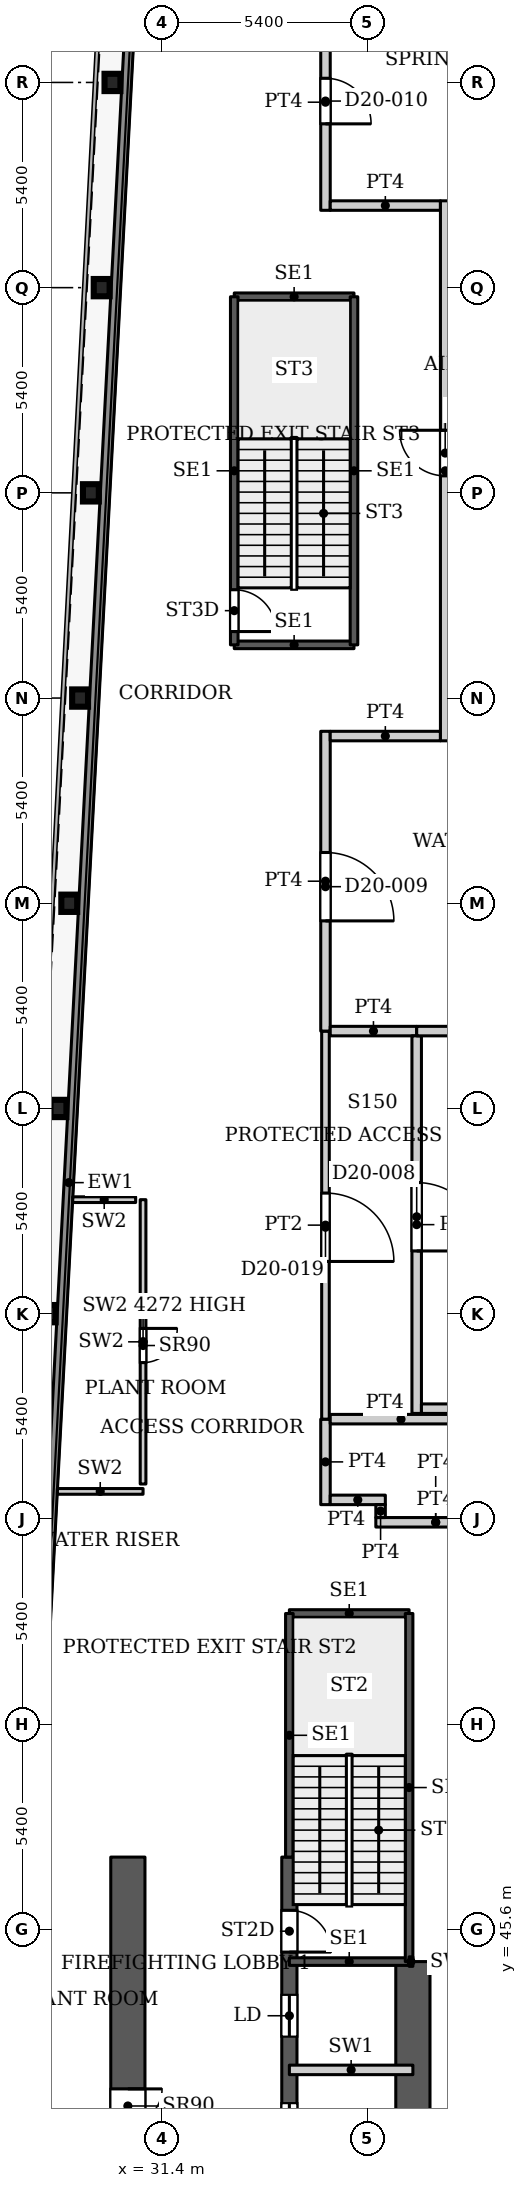
"""IFC4 building model, lengths in metres.
Left out: names, types, materials, properties, quantities, classifications, styles, units other than length and angle.
Written with IfcOpenShell. Run it as: python <this file> out.ifc"""

import sys

from ifc_helpers import new_model, si_unit, direction, frame, frame_2d, origin, origin_2d, place, context, subcontext, project, spatial, rectangle, i_section, extrude, source, transform, mapped, element, fill, save


model = new_model("IFC4")
c1 = context("Model", 3, precision=1e-05, world=origin(), true_north=direction((0.0, 1.0)))
c2 = subcontext(c1, "Body", "Model", "MODEL_VIEW")
j1 = project(units=[si_unit("LENGTHUNIT", "METRE"), si_unit("PLANEANGLEUNIT", "RADIAN")], contexts=[c1])
p1 = place(None, origin())
s1 = spatial("IfcSite", under=j1, at=p1, CompositionType="ELEMENT")
p2 = place(p1, origin())
s2 = spatial("IfcBuilding", under=s1, at=p2, CompositionType="ELEMENT")
p3 = place(p2, frame((0.0, 0.0, 89.0)))
s3 = spatial("IfcBuildingStorey", under=s2, at=p3, CompositionType="ELEMENT", Elevation=89.0)
for number, where, z_axis, x_axis in (
    (1, (28.39, 61.8, 0.0), (0.0, 0.0, 1.0), (1.0, 0.0, 0.0)),
    (2, (28.674, 67.2, 0.0), (0.0, 0.0, 1.0), (1.0, 0.0, 0.0)),
    (3, (28.958, 72.6, 0.0), (0.0, 0.0, 1.0), (1.0, 0.0, 0.0)),
    (4, (29.243, 78.0, 0.0), (0.0, 0.0, 1.0), (1.0, 0.0, 0.0)),
    (5, (29.527, 83.4, 0.0), (0.0, 0.0, 1.0), (1.0, 0.0, 0.0)),
    (6, (29.811, 88.8, 0.0), (0.0, 0.0, 1.0), (1.0, 0.0, 0.0)),
    (7, (30.095, 94.2, 0.0), (0.0, 0.0, 1.0), (1.0, 0.0, 0.0)),
):
    element("IfcColumn", number, at=place(p3, frame(where, z_axis=z_axis, x_axis=x_axis)), inside=s3, PredefinedType="COLUMN", context=c2, shape_type="SweptSolid", body=[
        extrude(i_section(OverallWidth=0.418, OverallDepth=0.455, WebThickness=0.042, FlangeThickness=0.068, FilletRadius=0.014, at=origin_2d()), origin(), (0.0, 0.0, 1.0), 5.1),
    ])
p4 = place(p3, frame((34.75, 29.05, 0.0), z_axis=(0.0, 0.0, 1.0), x_axis=(0.0, 1.0, 0.0)))
e8 = element("IfcWall", 8, at=p4, inside=s3, PredefinedType="SHEAR", context=c2, shape_type="SweptSolid", body=[
    extrude(rectangle(XDim=18.45, YDim=0.4, at=frame_2d((9.225, 0.0))), origin(), (0.0, 0.0, 1.0), 5.1),
])
p5 = place(p4, frame((8.025, 0.0, 0.0)))
e9 = element("IfcOpeningElement", 9, at=p5, cuts=e8, PredefinedType="OPENING", context=c2, shape_type="SweptSolid", body=[
    extrude(rectangle(XDim=1.1, YDim=2.2, at=frame_2d((0.55, 1.1))), frame((0.0, 0.21, 0.0), z_axis=(0.0, -1.0, 0.0), x_axis=(1.0, 0.0, 0.0)), (0.0, 0.0, 1.0), 0.42),
])
p6 = place(p4, frame((10.875, 0.0, 0.0)))
e10 = element("IfcOpeningElement", 10, at=p6, cuts=e8, PredefinedType="OPENING", context=c2, shape_type="SweptSolid", body=[
    extrude(rectangle(XDim=1.1, YDim=2.2, at=frame_2d((0.55, 1.1))), frame((0.0, 0.21, 0.0), z_axis=(0.0, -1.0, 0.0), x_axis=(1.0, 0.0, 0.0)), (0.0, 0.0, 1.0), 0.42),
])
p7 = place(p4, frame((13.725, 0.0, 0.0)))
e11 = element("IfcOpeningElement", 11, at=p7, cuts=e8, PredefinedType="OPENING", context=c2, shape_type="SweptSolid", body=[
    extrude(rectangle(XDim=1.1, YDim=2.2, at=frame_2d((0.55, 1.1))), frame((0.0, 0.21, 0.0), z_axis=(0.0, -1.0, 0.0), x_axis=(1.0, 0.0, 0.0)), (0.0, 0.0, 1.0), 0.42),
])
p8 = place(p4, frame((15.95, 0.0, 0.0)))
e12 = element("IfcOpeningElement", 12, at=p8, cuts=e8, PredefinedType="OPENING", context=c2, shape_type="SweptSolid", body=[
    extrude(rectangle(XDim=1.1, YDim=2.2, at=frame_2d((0.55, 1.1))), frame((0.0, 0.21, 0.0), z_axis=(0.0, -1.0, 0.0), x_axis=(1.0, 0.0, 0.0)), (0.0, 0.0, 1.0), 0.42),
])
p9 = place(p3, frame((38.0, 36.2, 0.0), z_axis=(0.0, 0.0, 1.0), x_axis=(0.0, 1.0, 0.0)))
e13 = element("IfcWall", 13, at=p9, inside=s3, PredefinedType="SHEAR", context=c2, shape_type="SweptSolid", body=[
    extrude(rectangle(XDim=8.55, YDim=0.9, at=frame_2d((4.275, 0.0))), origin(), (0.0, 0.0, 1.0), 5.1),
])
p10 = place(p3, frame((30.5, 29.05, 0.0), z_axis=(0.0, 0.0, 1.0), x_axis=(0.0, 1.0, 0.0)))
e14 = element("IfcWall", 14, at=p10, inside=s3, PredefinedType="SHEAR", context=c2, shape_type="SweptSolid", body=[
    extrude(rectangle(XDim=18.45, YDim=0.9, at=frame_2d((9.225, 0.0))), origin(), (0.0, 0.0, 1.0), 5.1),
])
p11 = place(p10, frame((0.944, 0.0, 0.0)))
e15 = element("IfcOpeningElement", 15, at=p11, cuts=e14, PredefinedType="OPENING", context=c2, shape_type="SweptSolid", body=[
    extrude(rectangle(XDim=0.9, YDim=2.2, at=frame_2d((0.45, 1.1))), frame((0.0, 0.46, 0.0), z_axis=(0.0, -1.0, 0.0), x_axis=(1.0, 0.0, 0.0)), (0.0, 0.0, 1.0), 0.92),
])
p12 = place(p10, frame((6.975, 0.0, 0.0)))
e16 = element("IfcOpeningElement", 16, at=p12, cuts=e14, PredefinedType="OPENING", context=c2, shape_type="SweptSolid", body=[
    extrude(rectangle(XDim=0.9, YDim=2.2, at=frame_2d((0.45, 1.1))), frame((0.0, 0.46, 0.0), z_axis=(0.0, -1.0, 0.0), x_axis=(1.0, 0.0, 0.0)), (0.0, 0.0, 1.0), 0.92),
])
p13 = place(p10, frame((11.45, 0.0, 0.0)))
e17 = element("IfcOpeningElement", 17, at=p13, cuts=e14, PredefinedType="OPENING", context=c2, shape_type="SweptSolid", body=[
    extrude(rectangle(XDim=0.9, YDim=2.2, at=frame_2d((0.45, 1.1))), frame((0.0, 0.46, 0.0), z_axis=(0.0, -1.0, 0.0), x_axis=(1.0, 0.0, 0.0)), (0.0, 0.0, 1.0), 0.92),
])
p14 = place(p3, frame((27.195, 31.969, 0.0), z_axis=(0.0, 0.0, 1.0), x_axis=(0.052556141556, 0.99861797099, 0.0)))
e18 = element("IfcWall", 18, at=p14, inside=s3, PredefinedType="SOLIDWALL", context=c2, shape_type="SweptSolid", body=[
    extrude(rectangle(XDim=66.651, YDim=0.25, at=frame_2d((33.326, 0.0))), origin(), (0.0, 0.0, 1.0), 4.95),
])
for number, where, z_axis, x_axis in (
    (19, (34.75, 44.75, 0.0), (0.0, 0.0, 1.0), (1.0, 0.0, 0.0)),
    (20, (34.75, 53.91, 0.0), (0.0, 0.0, 1.0), (1.0, 0.0, 0.0)),
):
    element("IfcWall", number, at=place(p3, frame(where, z_axis=z_axis, x_axis=x_axis)), inside=s3, PredefinedType="SHEAR", context=c2, shape_type="SweptSolid", body=[
        extrude(rectangle(XDim=3.15, YDim=0.2, at=frame_2d((1.575, 0.0))), origin(), (0.0, 0.0, 1.0), 5.1),
    ])
p15 = place(p3, frame((34.75, 47.5, 0.0), z_axis=(0.0, 0.0, 1.0), x_axis=(0.0, 1.0, 0.0)))
e21 = element("IfcWall", 21, at=p15, inside=s3, PredefinedType="SHEAR", context=c2, shape_type="SweptSolid", body=[
    extrude(rectangle(XDim=6.41, YDim=0.2, at=frame_2d((3.205, 0.0))), origin(), (0.0, 0.0, 1.0), 5.1),
])
p16 = place(p3, frame((37.9, 44.75, 0.0), z_axis=(0.0, 0.0, 1.0), x_axis=(0.0, 1.0, 0.0)))
e22 = element("IfcWall", 22, at=p16, inside=s3, PredefinedType="SHEAR", context=c2, shape_type="SweptSolid", body=[
    extrude(rectangle(XDim=9.16, YDim=0.2, at=frame_2d((4.58, 0.0))), origin(), (0.0, 0.0, 1.0), 5.1),
])
for number, where, z_axis, x_axis in (
    (23, (33.3, 79.4, 0.0), (0.0, 0.0, 1.0), (1.0, 0.0, 0.0)),
    (24, (33.3, 88.56, 0.0), (0.0, 0.0, 1.0), (1.0, 0.0, 0.0)),
):
    element("IfcWall", number, at=place(p3, frame(where, z_axis=z_axis, x_axis=x_axis)), inside=s3, PredefinedType="SHEAR", context=c2, shape_type="SweptSolid", body=[
        extrude(rectangle(XDim=3.15, YDim=0.2, at=frame_2d((1.575, 0.0))), origin(), (0.0, 0.0, 1.0), 5.1),
    ])
p17 = place(p3, frame((33.3, 79.4, 0.0), z_axis=(0.0, 0.0, 1.0), x_axis=(0.0, 1.0, 0.0)))
e25 = element("IfcWall", 25, at=p17, inside=s3, PredefinedType="SHEAR", context=c2, shape_type="SweptSolid", body=[
    extrude(rectangle(XDim=9.16, YDim=0.2, at=frame_2d((4.58, 0.0))), origin(), (0.0, 0.0, 1.0), 5.1),
])
p18 = place(p17, frame((0.35, 0.0, 0.0)))
e26 = element("IfcOpeningElement", 26, at=p18, cuts=e25, PredefinedType="OPENING", context=c2, shape_type="SweptSolid", body=[
    extrude(rectangle(XDim=1.1, YDim=2.2, at=frame_2d((0.55, 1.1))), frame((0.0, 0.11, 0.0), z_axis=(0.0, -1.0, 0.0), x_axis=(1.0, 0.0, 0.0)), (0.0, 0.0, 1.0), 0.22),
])
p19 = place(p3, frame((36.45, 79.4, 0.0), z_axis=(0.0, 0.0, 1.0), x_axis=(0.0, 1.0, 0.0)))
e27 = element("IfcWall", 27, at=p19, inside=s3, PredefinedType="SHEAR", context=c2, shape_type="SweptSolid", body=[
    extrude(rectangle(XDim=9.16, YDim=0.2, at=frame_2d((4.58, 0.0))), origin(), (0.0, 0.0, 1.0), 5.1),
])
p20 = place(p3, frame((34.75, 41.9, 0.0), z_axis=(0.0, 0.0, 1.0), x_axis=(1.0, 0.0, 0.0)))
e28 = element("IfcWall", 28, at=p20, inside=s3, PredefinedType="PARTITIONING", context=c2, shape_type="SweptSolid", body=[
    extrude(rectangle(XDim=3.25, YDim=0.25, at=frame_2d((1.625, 0.0))), origin(), (0.0, 0.0, 1.0), 5.1),
])
p21 = place(p3, frame((37.9, 44.75, 0.0), z_axis=(0.0, 0.0, 1.0), x_axis=(1.0, 0.0, 0.0)))
e29 = element("IfcWall", 29, at=p21, inside=s3, PredefinedType="PARTITIONING", context=c2, shape_type="SweptSolid", body=[
    extrude(rectangle(XDim=0.1, YDim=0.25, at=frame_2d((0.05, 0.0))), origin(), (0.0, 0.0, 1.0), 5.1),
])
p22 = place(p3, frame((28.646, 57.123, 0.0), z_axis=(0.0, 0.0, 1.0), x_axis=(1.0, 0.0, 0.0)))
e30 = element("IfcWall", 30, at=p22, inside=s3, PredefinedType="PARTITIONING", context=c2, shape_type="SweptSolid", body=[
    extrude(rectangle(XDim=2.254, YDim=0.15, at=frame_2d((1.127, 0.0))), origin(), (0.0, 0.0, 1.0), 5.1),
])
p23 = place(p3, frame((30.9, 57.318, 0.0), z_axis=(0.0, 0.0, 1.0), x_axis=(0.0, 1.0, 0.0)))
e31 = element("IfcWall", 31, at=p23, inside=s3, PredefinedType="PARTITIONING", context=c2, shape_type="SweptSolid", body=[
    extrude(rectangle(XDim=7.482, YDim=0.15, at=frame_2d((3.741, 0.0))), origin(), (0.0, 0.0, 1.0), 4.272),
])
p24 = place(p23, frame((3.194, 0.0, 0.0)))
e32 = element("IfcOpeningElement", 32, at=p24, cuts=e31, PredefinedType="OPENING", context=c2, shape_type="SweptSolid", body=[
    extrude(rectangle(XDim=0.9, YDim=2.2, at=frame_2d((0.45, 1.1))), frame((0.0, 0.085, 0.0), z_axis=(0.0, -1.0, 0.0), x_axis=(1.0, 0.0, 0.0)), (0.0, 0.0, 1.0), 0.17),
])
p25 = place(p3, frame((29.05, 64.8, 0.0), z_axis=(0.0, 0.0, 1.0), x_axis=(1.0, 0.0, 0.0)))
e33 = element("IfcWall", 33, at=p25, inside=s3, PredefinedType="PARTITIONING", context=c2, shape_type="SweptSolid", body=[
    extrude(rectangle(XDim=1.655, YDim=0.15, at=frame_2d((0.828, 0.0))), origin(), (0.0, 0.0, 1.0), 5.1),
])
p26 = place(p3, frame((35.7, 56.775, 0.0), z_axis=(0.0, 0.0, 1.0), x_axis=(0.0, 1.0, 0.0)))
e34 = element("IfcWall", 34, at=p26, inside=s3, PredefinedType="PARTITIONING", context=c2, shape_type="SweptSolid", body=[
    extrude(rectangle(XDim=2.249, YDim=0.25, at=frame_2d((1.125, 0.0))), origin(), (0.0, 0.0, 1.0), 4.8),
])
p27 = place(p3, frame((35.7, 59.024, 0.0), z_axis=(0.0, 0.0, 1.0), x_axis=(0.0, 1.0, 0.0)))
e35 = element("IfcWall", 35, at=p27, inside=s3, PredefinedType="PARTITIONING", context=c2, shape_type="SweptSolid", body=[
    extrude(rectangle(XDim=10.212, YDim=0.2, at=frame_2d((5.106, 0.0))), origin(), (0.0, 0.0, 1.0), 4.8),
])
p28 = place(p27, frame((4.15, 0.0, 0.0)))
e36 = element("IfcOpeningElement", 36, at=p28, cuts=e35, PredefinedType="OPENING", context=c2, shape_type="SweptSolid", body=[
    extrude(rectangle(XDim=1.8, YDim=2.1, at=frame_2d((0.9, 1.05))), frame((0.0, 0.11, 0.0), z_axis=(0.0, -1.0, 0.0), x_axis=(1.0, 0.0, 0.0)), (0.0, 0.0, 1.0), 0.22),
])
p29 = place(p3, frame((35.7, 69.236, 0.0), z_axis=(0.0, 0.0, 1.0), x_axis=(0.0, 1.0, 0.0)))
e37 = element("IfcWall", 37, at=p29, inside=s3, PredefinedType="PARTITIONING", context=c2, shape_type="SweptSolid", body=[
    extrude(rectangle(XDim=7.889, YDim=0.25, at=frame_2d((3.944, 0.0))), origin(), (0.0, 0.0, 1.0), 4.8),
])
p30 = place(p29, frame((2.9, 0.0, 0.0)))
e38 = element("IfcOpeningElement", 38, at=p30, cuts=e37, PredefinedType="OPENING", context=c2, shape_type="SweptSolid", body=[
    extrude(rectangle(XDim=1.8, YDim=2.1, at=frame_2d((0.9, 1.05))), frame((0.0, 0.135, 0.0), z_axis=(0.0, -1.0, 0.0), x_axis=(1.0, 0.0, 0.0)), (0.0, 0.0, 1.0), 0.27),
])
p31 = place(p3, frame((35.7, 90.835, 0.0), z_axis=(0.0, 0.0, 1.0), x_axis=(0.0, 1.0, 0.0)))
e39 = element("IfcWall", 39, at=p31, inside=s3, PredefinedType="PARTITIONING", context=c2, shape_type="SweptSolid", body=[
    extrude(rectangle(XDim=5.69, YDim=0.25, at=frame_2d((2.845, 0.0))), origin(), (0.0, 0.0, 1.0), 4.8),
])
p32 = place(p31, frame((2.275, 0.0, 0.0)))
e40 = element("IfcOpeningElement", 40, at=p32, cuts=e39, PredefinedType="OPENING", context=c2, shape_type="SweptSolid", body=[
    extrude(rectangle(XDim=1.2, YDim=2.1, at=frame_2d((0.6, 1.05))), frame((0.0, 0.135, 0.0), z_axis=(0.0, -1.0, 0.0), x_axis=(1.0, 0.0, 0.0)), (0.0, 0.0, 1.0), 0.27),
])
p33 = place(p3, frame((35.825, 56.9, 0.0), z_axis=(0.0, 0.0, 1.0), x_axis=(1.0, 0.0, 0.0)))
e41 = element("IfcWall", 41, at=p33, inside=s3, PredefinedType="PARTITIONING", context=c2, shape_type="SweptSolid", body=[
    extrude(rectangle(XDim=1.45, YDim=0.25, at=frame_2d((0.725, 0.0))), origin(), (0.0, 0.0, 1.0), 4.8),
])
p34 = place(p3, frame((35.825, 59.024, 0.0), z_axis=(0.0, 0.0, 1.0), x_axis=(1.0, 0.0, 0.0)))
e42 = element("IfcWall", 42, at=p34, inside=s3, PredefinedType="PARTITIONING", context=c2, shape_type="SweptSolid", body=[
    extrude(rectangle(XDim=3.725, YDim=0.25, at=frame_2d((1.863, 0.0))), origin(), (0.0, 0.0, 1.0), 4.8),
])
p35 = place(p3, frame((35.825, 69.236, 0.0), z_axis=(0.0, 0.0, 1.0), x_axis=(1.0, 0.0, 0.0)))
e43 = element("IfcWall", 43, at=p35, inside=s3, PredefinedType="PARTITIONING", context=c2, shape_type="SweptSolid", body=[
    extrude(rectangle(XDim=2.275, YDim=0.25, at=frame_2d((1.138, 0.0))), origin(), (0.0, 0.0, 1.0), 4.8),
])
for number, where, z_axis, x_axis in (
    (44, (35.825, 77.0, 0.0), (0.0, 0.0, 1.0), (1.0, 0.0, 0.0)),
    (45, (35.825, 90.96, 0.0), (0.0, 0.0, 1.0), (1.0, 0.0, 0.0)),
):
    element("IfcWall", number, at=place(p3, frame(where, z_axis=z_axis, x_axis=x_axis)), inside=s3, PredefinedType="PARTITIONING", context=c2, shape_type="SweptSolid", body=[
        extrude(rectangle(XDim=2.9, YDim=0.25, at=frame_2d((1.45, 0.0))), origin(), (0.0, 0.0, 1.0), 4.8),
    ])
p36 = place(p3, frame((37.025, 56.31, 0.0), z_axis=(0.0, 0.0, 1.0), x_axis=(1.0, 0.0, 0.0)))
e46 = element("IfcWall", 46, at=p36, inside=s3, PredefinedType="PARTITIONING", context=c2, shape_type="SweptSolid", body=[
    extrude(rectangle(XDim=3.15, YDim=0.25, at=frame_2d((1.575, 0.0))), origin(), (0.0, 0.0, 1.0), 4.272),
])
p37 = place(p3, frame((37.15, 56.435, 0.0), z_axis=(0.0, 0.0, 1.0), x_axis=(0.0, 1.0, 0.0)))
e47 = element("IfcWall", 47, at=p37, inside=s3, PredefinedType="PARTITIONING", context=c2, shape_type="SweptSolid", body=[
    extrude(rectangle(XDim=0.34, YDim=0.25, at=frame_2d((0.17, 0.0))), origin(), (0.0, 0.0, 1.0), 4.8),
])
p38 = place(p3, frame((38.1, 59.175, 0.0), z_axis=(0.0, 0.0, 1.0), x_axis=(0.0, 1.0, 0.0)))
e48 = element("IfcWall", 48, at=p38, inside=s3, PredefinedType="PARTITIONING", context=c2, shape_type="SweptSolid", body=[
    extrude(rectangle(XDim=9.936, YDim=0.25, at=frame_2d((4.968, 0.0))), origin(), (0.0, 0.0, 1.0), 4.8),
])
p39 = place(p38, frame((4.275, 0.0, 0.0)))
e49 = element("IfcOpeningElement", 49, at=p39, cuts=e48, PredefinedType="OPENING", context=c2, shape_type="SweptSolid", body=[
    extrude(rectangle(XDim=1.8, YDim=2.1, at=frame_2d((0.9, 1.05))), frame((0.0, 0.135, 0.0), z_axis=(0.0, -1.0, 0.0), x_axis=(1.0, 0.0, 0.0)), (0.0, 0.0, 1.0), 0.27),
])
p40 = place(p3, frame((38.1, 69.236, 0.0), z_axis=(0.0, 0.0, 1.0), x_axis=(1.0, 0.0, 0.0)))
e50 = element("IfcWall", 50, at=p40, inside=s3, PredefinedType="PARTITIONING", context=c2, shape_type="SweptSolid", body=[
    extrude(rectangle(XDim=7.555, YDim=0.25, at=frame_2d((3.777, 0.0))), origin(), (0.0, 0.0, 1.0), 4.8),
])
p41 = place(p3, frame((38.225, 59.3, 0.0), z_axis=(0.0, 0.0, 1.0), x_axis=(1.0, 0.0, 0.0)))
e51 = element("IfcWall", 51, at=p41, inside=s3, PredefinedType="PARTITIONING", context=c2, shape_type="SweptSolid", body=[
    extrude(rectangle(XDim=1.325, YDim=0.25, at=frame_2d((0.663, 0.0))), origin(), (0.0, 0.0, 1.0), 4.8),
])
p42 = place(p3, frame((38.85, 76.875, 0.0), z_axis=(0.0, 0.0, 1.0), x_axis=(0.0, 1.0, 0.0)))
e52 = element("IfcWall", 52, at=p42, inside=s3, PredefinedType="PARTITIONING", context=c2, shape_type="SweptSolid", body=[
    extrude(rectangle(XDim=14.21, YDim=0.25, at=frame_2d((7.105, 0.0))), origin(), (0.0, 0.0, 1.0), 4.8),
])
p43 = place(p42, frame((6.972, 0.0, 0.0)))
e53 = element("IfcOpeningElement", 53, at=p43, cuts=e52, PredefinedType="OPENING", context=c2, shape_type="SweptSolid", body=[
    extrude(rectangle(XDim=1.2, YDim=2.1, at=frame_2d((0.6, 1.05))), frame((0.0, 0.135, 0.0), z_axis=(0.0, -1.0, 0.0), x_axis=(1.0, 0.0, 0.0)), (0.0, 0.0, 1.0), 0.27),
])
m1 = source(origin(), c2, "Body", "SweptSolid", [
    extrude(rectangle(XDim=1.1, YDim=2.2, at=frame_2d((0.55, 1.1))), frame((0.0, 0.025, 0.0), z_axis=(0.0, -1.0, 0.0), x_axis=(1.0, 0.0, 0.0)), (0.0, 0.0, 1.0), 0.05),
])
p44 = place(p6, origin())
e54 = element("IfcDoor", 54, at=p44, inside=s3, OperationType="SLIDING_TO_LEFT", PredefinedType="DOOR", context=c2, shape_type="MappedRepresentation", body=[
    mapped(m1, transform((0.0, 0.0, 0.0), x_axis=(1.0, 0.0, 0.0), y_axis=(0.0, 1.0, 0.0), z_axis=(0.0, 0.0, 1.0), scale=1.0)),
])
fill(e10, e54)
p45 = place(p7, origin())
e55 = element("IfcDoor", 55, at=p45, inside=s3, OperationType="SLIDING_TO_LEFT", PredefinedType="DOOR", context=c2, shape_type="MappedRepresentation", body=[
    mapped(m1, transform((0.0, 0.0, 0.0), x_axis=(1.0, 0.0, 0.0), y_axis=(0.0, 1.0, 0.0), z_axis=(0.0, 0.0, 1.0), scale=1.0)),
])
fill(e11, e55)
m2 = source(origin(), c2, "Body", "SweptSolid", [
    extrude(rectangle(XDim=0.9, YDim=2.2, at=frame_2d((0.45, 1.1))), frame((0.0, 0.025, 0.0), z_axis=(0.0, -1.0, 0.0), x_axis=(1.0, 0.0, 0.0)), (0.0, 0.0, 1.0), 0.05),
])
p46 = place(p13, origin())
e56 = element("IfcDoor", 56, at=p46, inside=s3, OperationType="SINGLE_SWING_RIGHT", PredefinedType="DOOR", context=c2, shape_type="MappedRepresentation", body=[
    mapped(m2, transform((0.0, 0.0, 0.0), x_axis=(1.0, 0.0, 0.0), y_axis=(0.0, 1.0, 0.0), z_axis=(0.0, 0.0, 1.0), scale=1.0)),
])
fill(e17, e56)
p47 = place(p24, origin())
e57 = element("IfcDoor", 57, at=p47, inside=s3, OperationType="SINGLE_SWING_RIGHT", PredefinedType="DOOR", context=c2, shape_type="MappedRepresentation", body=[
    mapped(m2, transform((0.0, 0.0, 0.0), x_axis=(1.0, 0.0, 0.0), y_axis=(0.0, 1.0, 0.0), z_axis=(0.0, 0.0, 1.0), scale=1.0)),
])
fill(e32, e57)
m3 = source(origin(), c2, "Body", "SweptSolid", [
    extrude(rectangle(XDim=1.1, YDim=2.2, at=frame_2d((0.55, 1.1))), frame((0.0, 0.025, 0.0), z_axis=(0.0, -1.0, 0.0), x_axis=(1.0, 0.0, 0.0)), (0.0, 0.0, 1.0), 0.05),
])
p48 = place(p8, origin())
e58 = element("IfcDoor", 58, at=p48, inside=s3, OperationType="SINGLE_SWING_RIGHT", PredefinedType="DOOR", context=c2, shape_type="MappedRepresentation", body=[
    mapped(m3, transform((0.0, 0.0, 0.0), x_axis=(1.0, 0.0, 0.0), y_axis=(0.0, 1.0, 0.0), z_axis=(0.0, 0.0, 1.0), scale=1.0)),
])
fill(e12, e58)
p49 = place(p18, origin())
e59 = element("IfcDoor", 59, at=p49, inside=s3, OperationType="SINGLE_SWING_RIGHT", PredefinedType="DOOR", context=c2, shape_type="MappedRepresentation", body=[
    mapped(m3, transform((0.0, 0.0, 0.0), x_axis=(1.0, 0.0, 0.0), y_axis=(0.0, 1.0, 0.0), z_axis=(0.0, 0.0, 1.0), scale=1.0)),
])
fill(e26, e59)
m4 = source(origin(), c2, "Body", "SweptSolid", [
    extrude(rectangle(XDim=1.8, YDim=2.1, at=frame_2d((0.9, 1.05))), frame((0.0, 0.025, 0.0), z_axis=(0.0, -1.0, 0.0), x_axis=(1.0, 0.0, 0.0)), (0.0, 0.0, 1.0), 0.05),
])
p50 = place(p39, origin())
e60 = element("IfcDoor", 60, at=p50, inside=s3, OperationType="DOUBLE_DOOR_SINGLE_SWING", PredefinedType="DOOR", context=c2, shape_type="MappedRepresentation", body=[
    mapped(m4, transform((0.0, 0.0, 0.0), x_axis=(1.0, 0.0, 0.0), y_axis=(0.0, 1.0, 0.0), z_axis=(0.0, 0.0, 1.0), scale=1.0)),
])
fill(e49, e60)
p51 = place(p30, origin())
e61 = element("IfcDoor", 61, at=p51, inside=s3, OperationType="DOUBLE_DOOR_SINGLE_SWING", PredefinedType="DOOR", context=c2, shape_type="MappedRepresentation", body=[
    mapped(m4, transform((0.0, 0.0, 0.0), x_axis=(1.0, 0.0, 0.0), y_axis=(0.0, 1.0, 0.0), z_axis=(0.0, 0.0, 1.0), scale=1.0)),
])
fill(e38, e61)
m5 = source(origin(), c2, "Body", "SweptSolid", [
    extrude(rectangle(XDim=1.2, YDim=2.1, at=frame_2d((0.6, 1.05))), frame((0.0, 0.025, 0.0), z_axis=(0.0, -1.0, 0.0), x_axis=(1.0, 0.0, 0.0)), (0.0, 0.0, 1.0), 0.05),
])
p52 = place(p32, origin())
e62 = element("IfcDoor", 62, at=p52, inside=s3, OperationType="SINGLE_SWING_RIGHT", PredefinedType="DOOR", context=c2, shape_type="MappedRepresentation", body=[
    mapped(m5, transform((0.0, 0.0, 0.0), x_axis=(1.0, 0.0, 0.0), y_axis=(0.0, 1.0, 0.0), z_axis=(0.0, 0.0, 1.0), scale=1.0)),
])
fill(e40, e62)
p53 = place(p43, origin())
e63 = element("IfcDoor", 63, at=p53, inside=s3, OperationType="SINGLE_SWING_LEFT", PredefinedType="DOOR", context=c2, shape_type="MappedRepresentation", body=[
    mapped(m5, transform((0.0, 0.0, 0.0), x_axis=(1.0, 0.0, 0.0), y_axis=(0.0, 1.0, 0.0), z_axis=(0.0, 0.0, 1.0), scale=1.0)),
])
fill(e53, e63)
m6 = source(origin(), c2, "Body", "SweptSolid", [
    extrude(rectangle(XDim=1.8, YDim=2.1, at=frame_2d((0.9, 1.05))), frame((0.0, 0.025, 0.0), z_axis=(0.0, -1.0, 0.0), x_axis=(1.0, 0.0, 0.0)), (0.0, 0.0, 1.0), 0.05),
])
p54 = place(p28, origin())
e64 = element("IfcDoor", 64, at=p54, inside=s3, OperationType="DOUBLE_DOOR_SINGLE_SWING", PredefinedType="DOOR", context=c2, shape_type="MappedRepresentation", body=[
    mapped(m6, transform((0.0, 0.0, 0.0), x_axis=(1.0, 0.0, 0.0), y_axis=(0.0, 1.0, 0.0), z_axis=(0.0, 0.0, 1.0), scale=1.0)),
])
fill(e36, e64)
save(model, sys.argv[1])
